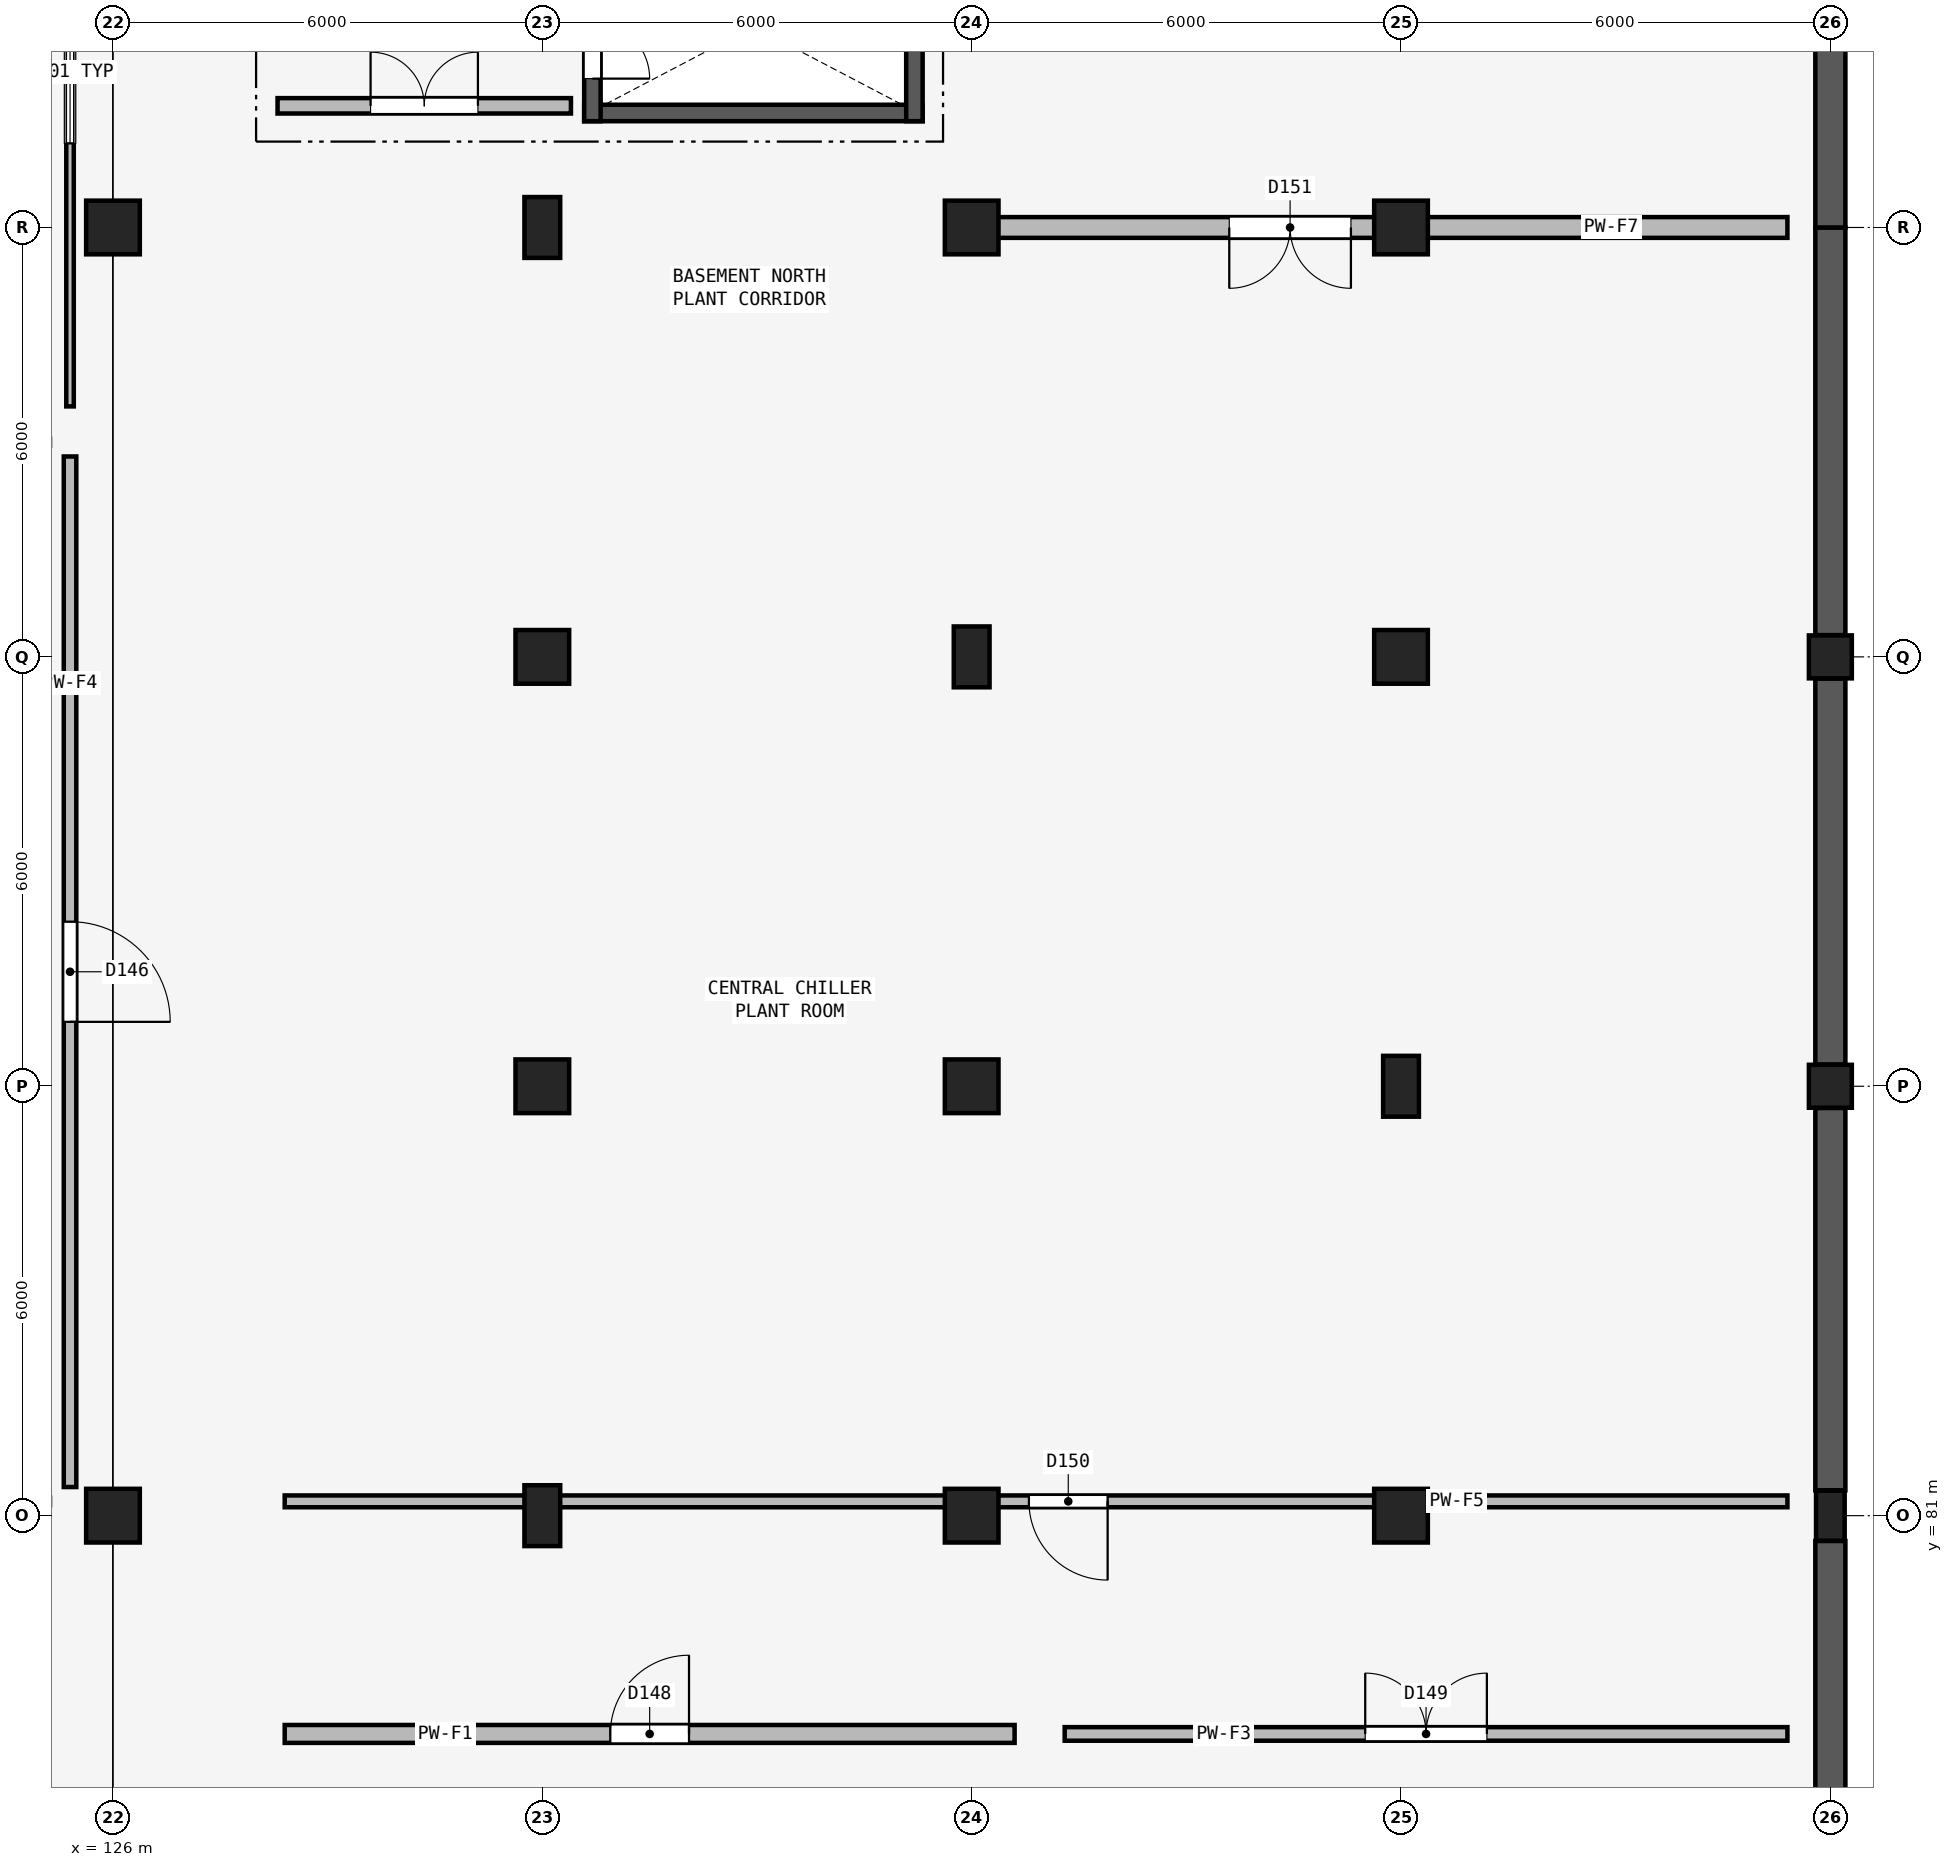
"""IFC4 building model, lengths in metres.
Left out: names, types, materials, properties, quantities, classifications, styles, units other than length and angle.
Written with IfcOpenShell. Run it as: python <this file> out.ifc"""

import sys

from ifc_helpers import new_model, si_unit, direction, frame, frame_2d, origin, origin_2d, place, context, subcontext, project, spatial, rectangle, extrude, element, fill, save


model = new_model("IFC4")
c1 = context("Model", 3, precision=1e-05, world=origin(), true_north=direction((0.0, 1.0)))
c2 = subcontext(c1, "Body", "Model", "MODEL_VIEW")
j1 = project(units=[si_unit("LENGTHUNIT", "METRE"), si_unit("PLANEANGLEUNIT", "RADIAN")], contexts=[c1])
p1 = place(None, origin())
s1 = spatial("IfcSite", under=j1, at=p1, CompositionType="ELEMENT")
p2 = place(p1, origin())
s2 = spatial("IfcBuilding", under=s1, at=p2, CompositionType="ELEMENT")
p3 = place(p2, frame((0.0, 0.0, -4.5)))
s3 = spatial("IfcBuildingStorey", under=s2, at=p3, CompositionType="ELEMENT", Elevation=-4.5)
for number, where, z_axis, x_axis in (
    (1, (126.0, 81.0, 0.0), (0.0, 0.0, 1.0), (1.0, 0.0, 0.0)),
    (2, (126.0, 99.0, 0.0), (0.0, 0.0, 1.0), (1.0, 0.0, 0.0)),
):
    element("IfcColumn", number, at=place(p3, frame(where, z_axis=z_axis, x_axis=x_axis)), inside=s3, PredefinedType="COLUMN", context=c2, shape_type="SweptSolid", body=[
        extrude(rectangle(XDim=0.75, YDim=0.75, at=origin_2d()), origin(), (0.0, 0.0, 1.0), 4.5),
    ])
p4 = place(p3, frame((132.0, 81.0, 0.0), z_axis=(0.0, 0.0, 1.0), x_axis=(1.0, 0.0, 0.0)))
e3 = element("IfcColumn", 3, at=p4, inside=s3, PredefinedType="COLUMN", context=c2, shape_type="SweptSolid", body=[
    extrude(rectangle(XDim=0.5, YDim=0.85, at=origin_2d()), origin(), (0.0, 0.0, 1.0), 4.5),
])
for number, where, z_axis, x_axis in (
    (4, (132.0, 87.0, 0.0), (0.0, 0.0, 1.0), (1.0, 0.0, 0.0)),
    (5, (132.0, 93.0, 0.0), (0.0, 0.0, 1.0), (1.0, 0.0, 0.0)),
):
    element("IfcColumn", number, at=place(p3, frame(where, z_axis=z_axis, x_axis=x_axis)), inside=s3, PredefinedType="COLUMN", context=c2, shape_type="SweptSolid", body=[
        extrude(rectangle(XDim=0.75, YDim=0.75, at=origin_2d()), origin(), (0.0, 0.0, 1.0), 4.5),
    ])
p5 = place(p3, frame((132.0, 99.0, 0.0), z_axis=(0.0, 0.0, 1.0), x_axis=(1.0, 0.0, 0.0)))
e6 = element("IfcColumn", 6, at=p5, inside=s3, PredefinedType="COLUMN", context=c2, shape_type="SweptSolid", body=[
    extrude(rectangle(XDim=0.5, YDim=0.85, at=origin_2d()), origin(), (0.0, 0.0, 1.0), 4.5),
])
for number, where, z_axis, x_axis in (
    (7, (138.0, 81.0, 0.0), (0.0, 0.0, 1.0), (1.0, 0.0, 0.0)),
    (8, (138.0, 87.0, 0.0), (0.0, 0.0, 1.0), (1.0, 0.0, 0.0)),
):
    element("IfcColumn", number, at=place(p3, frame(where, z_axis=z_axis, x_axis=x_axis)), inside=s3, PredefinedType="COLUMN", context=c2, shape_type="SweptSolid", body=[
        extrude(rectangle(XDim=0.75, YDim=0.75, at=origin_2d()), origin(), (0.0, 0.0, 1.0), 4.5),
    ])
p6 = place(p3, frame((138.0, 93.0, 0.0), z_axis=(0.0, 0.0, 1.0), x_axis=(1.0, 0.0, 0.0)))
e9 = element("IfcColumn", 9, at=p6, inside=s3, PredefinedType="COLUMN", context=c2, shape_type="SweptSolid", body=[
    extrude(rectangle(XDim=0.5, YDim=0.85, at=origin_2d()), origin(), (0.0, 0.0, 1.0), 4.5),
])
for number, where, z_axis, x_axis in (
    (10, (138.0, 99.0, 0.0), (0.0, 0.0, 1.0), (1.0, 0.0, 0.0)),
    (11, (144.0, 81.0, 0.0), (0.0, 0.0, 1.0), (1.0, 0.0, 0.0)),
):
    element("IfcColumn", number, at=place(p3, frame(where, z_axis=z_axis, x_axis=x_axis)), inside=s3, PredefinedType="COLUMN", context=c2, shape_type="SweptSolid", body=[
        extrude(rectangle(XDim=0.75, YDim=0.75, at=origin_2d()), origin(), (0.0, 0.0, 1.0), 4.5),
    ])
p7 = place(p3, frame((144.0, 87.0, 0.0), z_axis=(0.0, 0.0, 1.0), x_axis=(1.0, 0.0, 0.0)))
e12 = element("IfcColumn", 12, at=p7, inside=s3, PredefinedType="COLUMN", context=c2, shape_type="SweptSolid", body=[
    extrude(rectangle(XDim=0.5, YDim=0.85, at=origin_2d()), origin(), (0.0, 0.0, 1.0), 4.5),
])
for number, where, z_axis, x_axis in (
    (13, (144.0, 93.0, 0.0), (0.0, 0.0, 1.0), (1.0, 0.0, 0.0)),
    (14, (144.0, 99.0, 0.0), (0.0, 0.0, 1.0), (1.0, 0.0, 0.0)),
):
    element("IfcColumn", number, at=place(p3, frame(where, z_axis=z_axis, x_axis=x_axis)), inside=s3, PredefinedType="COLUMN", context=c2, shape_type="SweptSolid", body=[
        extrude(rectangle(XDim=0.75, YDim=0.75, at=origin_2d()), origin(), (0.0, 0.0, 1.0), 4.5),
    ])
p8 = place(p3, frame((150.0, 81.0, 0.0), z_axis=(0.0, 0.0, 1.0), x_axis=(1.0, 0.0, 0.0)))
e15 = element("IfcColumn", 15, at=p8, inside=s3, PredefinedType="COLUMN", context=c2, shape_type="SweptSolid", body=[
    extrude(rectangle(XDim=0.4, YDim=0.7, at=origin_2d()), origin(), (0.0, 0.0, 1.0), 4.5),
])
for number, where, z_axis, x_axis in (
    (16, (150.0, 87.0, 0.0), (0.0, 0.0, 1.0), (1.0, 0.0, 0.0)),
    (17, (150.0, 93.0, 0.0), (0.0, 0.0, 1.0), (1.0, 0.0, 0.0)),
):
    element("IfcColumn", number, at=place(p3, frame(where, z_axis=z_axis, x_axis=x_axis)), inside=s3, PredefinedType="COLUMN", context=c2, shape_type="SweptSolid", body=[
        extrude(rectangle(XDim=0.6, YDim=0.6, at=origin_2d()), origin(), (0.0, 0.0, 1.0), 4.5),
    ])
for number, where, z_axis, x_axis in (
    (18, (150.0, 75.304, 0.0), (0.0, 0.0, 1.0), (0.0, 1.0, 0.0)),
    (19, (150.0, 81.354, 0.0), (0.0, 0.0, 1.0), (0.0, 1.0, 0.0)),
):
    element("IfcWall", number, at=place(p3, frame(where, z_axis=z_axis, x_axis=x_axis)), inside=s3, PredefinedType="SHEAR", context=c2, shape_type="SweptSolid", body=[
        extrude(rectangle(XDim=5.342, YDim=0.42, at=frame_2d((2.671, 0.0))), origin(), (0.0, 0.0, 1.0), 4.195),
    ])
p9 = place(p3, frame((150.0, 87.304, 0.0), z_axis=(0.0, 0.0, 1.0), x_axis=(0.0, 1.0, 0.0)))
e20 = element("IfcWall", 20, at=p9, inside=s3, PredefinedType="SHEAR", context=c2, shape_type="SweptSolid", body=[
    extrude(rectangle(XDim=5.392, YDim=0.42, at=frame_2d((2.696, 0.0))), origin(), (0.0, 0.0, 1.0), 4.195),
])
p10 = place(p3, frame((150.0, 93.304, 0.0), z_axis=(0.0, 0.0, 1.0), x_axis=(0.0, 1.0, 0.0)))
e21 = element("IfcWall", 21, at=p10, inside=s3, PredefinedType="SHEAR", context=c2, shape_type="SweptSolid", body=[
    extrude(rectangle(XDim=5.696, YDim=0.42, at=frame_2d((2.848, 0.0))), origin(), (0.0, 0.0, 1.0), 4.195),
])
p11 = place(p3, frame((150.0, 99.0, 0.0), z_axis=(0.0, 0.0, 1.0), x_axis=(0.0, 1.0, 0.0)))
e22 = element("IfcWall", 22, at=p11, inside=s3, PredefinedType="SHEAR", context=c2, shape_type="SweptSolid", body=[
    extrude(rectangle(XDim=6.0, YDim=0.42, at=frame_2d((3.0, 0.0))), origin(), (0.0, 0.0, 1.0), 4.195),
])
p12 = place(p3, frame((132.585, 100.6, 0.0), z_axis=(0.0, 0.0, 1.0), x_axis=(1.0, 0.0, 0.0)))
e23 = element("IfcWall", 23, at=p12, inside=s3, PredefinedType="SHEAR", context=c2, shape_type="SweptSolid", body=[
    extrude(rectangle(XDim=4.73, YDim=0.23, at=frame_2d((2.365, 0.0))), origin(), (0.0, 0.0, 1.0), 4.36),
])
p13 = place(p3, frame((137.2, 100.485, 0.0), z_axis=(0.0, 0.0, 1.0), x_axis=(0.0, 1.0, 0.0)))
e24 = element("IfcWall", 24, at=p13, inside=s3, PredefinedType="SHEAR", context=c2, shape_type="SweptSolid", body=[
    extrude(rectangle(XDim=9.53, YDim=0.23, at=frame_2d((4.765, 0.0))), origin(), (0.0, 0.0, 1.0), 4.36),
])
p14 = place(p3, frame((132.7, 110.015, 0.0), z_axis=(0.0, 0.0, 1.0), x_axis=(0.0, -1.0, 0.0)))
e25 = element("IfcWall", 25, at=p14, inside=s3, PredefinedType="SHEAR", context=c2, shape_type="SweptSolid", body=[
    extrude(rectangle(XDim=9.53, YDim=0.23, at=frame_2d((4.765, 0.0))), origin(), (0.0, 0.0, 1.0), 4.36),
])
p15 = place(p14, frame((7.335, 0.0, 0.0)))
e26 = element("IfcOpeningElement", 26, at=p15, cuts=e25, PredefinedType="OPENING", context=c2, shape_type="SweptSolid", body=[
    extrude(rectangle(XDim=1.6, YDim=2.2, at=frame_2d((0.8, 1.1))), frame((0.0, 0.125, 0.0), z_axis=(0.0, -1.0, 0.0), x_axis=(1.0, 0.0, 0.0)), (0.0, 0.0, 1.0), 0.25),
])
p16 = place(p3, frame((128.3, 100.7, 0.0), z_axis=(0.0, 0.0, 1.0), x_axis=(1.0, 0.0, 0.0)))
e27 = element("IfcWall", 27, at=p16, inside=s3, PredefinedType="PARTITIONING", context=c2, shape_type="SweptSolid", body=[
    extrude(rectangle(XDim=4.1, YDim=0.215, at=frame_2d((2.05, 0.0))), origin(), (0.0, 0.0, 1.0), 3.44),
])
p17 = place(p16, frame((1.3, 0.0, 0.0)))
e28 = element("IfcOpeningElement", 28, at=p17, cuts=e27, PredefinedType="OPENING", context=c2, shape_type="SweptSolid", body=[
    extrude(rectangle(XDim=1.5, YDim=2.15, at=frame_2d((0.75, 1.075))), frame((0.0, 0.117, 0.0), z_axis=(0.0, -1.0, 0.0), x_axis=(1.0, 0.0, 0.0)), (0.0, 0.0, 1.0), 0.235),
])
p18 = place(p3, frame((125.4, 95.8, 0.0), z_axis=(0.0, 0.0, 1.0), x_axis=(0.0, -1.0, 0.0)))
e29 = element("IfcWall", 29, at=p18, inside=s3, PredefinedType="PARTITIONING", context=c2, shape_type="SweptSolid", body=[
    extrude(rectangle(XDim=14.4, YDim=0.175, at=frame_2d((7.2, 0.0))), origin(), (0.0, 0.0, 1.0), 4.19),
])
p19 = place(p18, frame((6.5, 0.0, 0.0)))
e30 = element("IfcOpeningElement", 30, at=p19, cuts=e29, PredefinedType="OPENING", context=c2, shape_type="SweptSolid", body=[
    extrude(rectangle(XDim=1.4, YDim=2.25, at=frame_2d((0.7, 1.125))), frame((0.0, 0.097, 0.0), z_axis=(0.0, -1.0, 0.0), x_axis=(1.0, 0.0, 0.0)), (0.0, 0.0, 1.0), 0.195),
])
p20 = place(p3, frame((125.4, 110.2, 0.0), z_axis=(0.0, 0.0, 1.0), x_axis=(0.0, -1.0, 0.0)))
e31 = element("IfcWall", 31, at=p20, inside=s3, PredefinedType="PARTITIONING", context=c2, shape_type="SweptSolid", body=[
    extrude(rectangle(XDim=13.7, YDim=0.105, at=frame_2d((6.85, 0.0))), origin(), (0.0, 0.0, 1.0), 3.49),
])
p21 = place(p20, frame((6.325, 0.0, 0.0)))
e32 = element("IfcOpeningElement", 32, at=p21, cuts=e31, PredefinedType="OPENING", context=c2, shape_type="SweptSolid", body=[
    extrude(rectangle(XDim=1.05, YDim=2.2, at=frame_2d((0.525, 1.1))), frame((0.0, 0.062, 0.0), z_axis=(0.0, -1.0, 0.0), x_axis=(1.0, 0.0, 0.0)), (0.0, 0.0, 1.0), 0.125),
])
p22 = place(p20, frame((8.025, 0.0, 1.0)))
e33 = element("IfcOpeningElement", 33, at=p22, cuts=e31, PredefinedType="OPENING", context=c2, shape_type="SweptSolid", body=[
    extrude(rectangle(XDim=2.0, YDim=1.2, at=frame_2d((1.0, 0.6))), frame((0.0, 0.062, 0.0), z_axis=(0.0, -1.0, 0.0), x_axis=(1.0, 0.0, 0.0)), (0.0, 0.0, 1.0), 0.125),
])
p23 = place(p3, frame((128.4, 77.95, 0.0), z_axis=(0.0, 0.0, 1.0), x_axis=(1.0, 0.0, 0.0)))
e34 = element("IfcWall", 34, at=p23, inside=s3, PredefinedType="PARTITIONING", context=c2, shape_type="SweptSolid", body=[
    extrude(rectangle(XDim=10.2, YDim=0.25, at=frame_2d((5.1, 0.0))), origin(), (0.0, 0.0, 1.0), 3.44),
])
p24 = place(p23, frame((4.55, 0.0, 0.0)))
e35 = element("IfcOpeningElement", 35, at=p24, cuts=e34, PredefinedType="OPENING", context=c2, shape_type="SweptSolid", body=[
    extrude(rectangle(XDim=1.1, YDim=2.1, at=frame_2d((0.55, 1.05))), frame((0.0, 0.135, 0.0), z_axis=(0.0, -1.0, 0.0), x_axis=(1.0, 0.0, 0.0)), (0.0, 0.0, 1.0), 0.27),
])
p25 = place(p3, frame((139.3, 77.95, 0.0), z_axis=(0.0, 0.0, 1.0), x_axis=(1.0, 0.0, 0.0)))
e36 = element("IfcWall", 36, at=p25, inside=s3, PredefinedType="PARTITIONING", context=c2, shape_type="SweptSolid", body=[
    extrude(rectangle(XDim=10.1, YDim=0.19, at=frame_2d((5.05, 0.0))), origin(), (0.0, 0.0, 1.0), 3.44),
])
p26 = place(p25, frame((4.2, 0.0, 0.0)))
e37 = element("IfcOpeningElement", 37, at=p26, cuts=e36, PredefinedType="OPENING", context=c2, shape_type="SweptSolid", body=[
    extrude(rectangle(XDim=1.7, YDim=2.35, at=frame_2d((0.85, 1.175))), frame((0.0, 0.105, 0.0), z_axis=(0.0, -1.0, 0.0), x_axis=(1.0, 0.0, 0.0)), (0.0, 0.0, 1.0), 0.21),
])
p27 = place(p3, frame((149.4, 81.2, 0.0), z_axis=(0.0, 0.0, 1.0), x_axis=(-1.0, 0.0, 0.0)))
e38 = element("IfcWall", 38, at=p27, inside=s3, PredefinedType="PARTITIONING", context=c2, shape_type="SweptSolid", body=[
    extrude(rectangle(XDim=21.0, YDim=0.165, at=frame_2d((10.5, 0.0))), origin(), (0.0, 0.0, 1.0), 3.44),
])
p28 = place(p27, frame((9.5, 0.0, 0.0)))
e39 = element("IfcOpeningElement", 39, at=p28, cuts=e38, PredefinedType="OPENING", context=c2, shape_type="SweptSolid", body=[
    extrude(rectangle(XDim=1.1, YDim=2.1, at=frame_2d((0.55, 1.05))), frame((0.0, 0.093, 0.0), z_axis=(0.0, -1.0, 0.0), x_axis=(1.0, 0.0, 0.0)), (0.0, 0.0, 1.0), 0.185),
])
p29 = place(p3, frame((149.4, 99.0, 0.0), z_axis=(0.0, 0.0, 1.0), x_axis=(-1.0, 0.0, 0.0)))
e40 = element("IfcWall", 40, at=p29, inside=s3, PredefinedType="PARTITIONING", context=c2, shape_type="SweptSolid", body=[
    extrude(rectangle(XDim=11.2, YDim=0.29, at=frame_2d((5.6, 0.0))), origin(), (0.0, 0.0, 1.0), 2.99),
])
p30 = place(p29, frame((6.1, 0.0, 0.0)))
e41 = element("IfcOpeningElement", 41, at=p30, cuts=e40, PredefinedType="OPENING", context=c2, shape_type="SweptSolid", body=[
    extrude(rectangle(XDim=1.7, YDim=2.35, at=frame_2d((0.85, 1.175))), frame((0.0, 0.155, 0.0), z_axis=(0.0, -1.0, 0.0), x_axis=(1.0, 0.0, 0.0)), (0.0, 0.0, 1.0), 0.31),
])
p31 = place(p15, origin())
e42 = element("IfcDoor", 42, at=p31, inside=s3, OperationType="DOUBLE_DOOR_SINGLE_SWING", PredefinedType="DOOR", context=c2, shape_type="SweptSolid", body=[
    extrude(rectangle(XDim=1.6, YDim=2.2, at=frame_2d((0.8, 1.1))), frame((0.0, 0.025, 0.0), z_axis=(0.0, -1.0, 0.0), x_axis=(1.0, 0.0, 0.0)), (0.0, 0.0, 1.0), 0.05),
])
fill(e26, e42)
p32 = place(p17, origin())
e43 = element("IfcDoor", 43, at=p32, inside=s3, OperationType="DOUBLE_DOOR_SINGLE_SWING", PredefinedType="DOOR", context=c2, shape_type="SweptSolid", body=[
    extrude(rectangle(XDim=1.5, YDim=2.15, at=frame_2d((0.75, 1.075))), frame((0.0, 0.025, 0.0), z_axis=(0.0, -1.0, 0.0), x_axis=(1.0, 0.0, 0.0)), (0.0, 0.0, 1.0), 0.05),
])
fill(e28, e43)
p33 = place(p19, origin())
e44 = element("IfcDoor", 44, at=p33, inside=s3, OperationType="SINGLE_SWING_RIGHT", PredefinedType="DOOR", context=c2, shape_type="SweptSolid", body=[
    extrude(rectangle(XDim=1.4, YDim=2.25, at=frame_2d((0.7, 1.125))), frame((0.0, 0.025, 0.0), z_axis=(0.0, -1.0, 0.0), x_axis=(1.0, 0.0, 0.0)), (0.0, 0.0, 1.0), 0.05),
])
fill(e30, e44)
p34 = place(p22, origin())
e45 = element("IfcWindow", 45, at=p34, inside=s3, PartitioningType="SINGLE_PANEL", PredefinedType="WINDOW", context=c2, shape_type="SweptSolid", body=[
    extrude(rectangle(XDim=2.0, YDim=1.2, at=frame_2d((1.0, 0.6))), frame((0.0, 0.03, 0.0), z_axis=(0.0, -1.0, 0.0), x_axis=(1.0, 0.0, 0.0)), (0.0, 0.0, 1.0), 0.06),
])
fill(e33, e45)
p35 = place(p24, origin())
e46 = element("IfcDoor", 46, at=p35, inside=s3, OperationType="SINGLE_SWING_RIGHT", PredefinedType="DOOR", context=c2, shape_type="SweptSolid", body=[
    extrude(rectangle(XDim=1.1, YDim=2.1, at=frame_2d((0.55, 1.05))), frame((0.0, 0.025, 0.0), z_axis=(0.0, -1.0, 0.0), x_axis=(1.0, 0.0, 0.0)), (0.0, 0.0, 1.0), 0.05),
])
fill(e35, e46)
p36 = place(p26, origin())
e47 = element("IfcDoor", 47, at=p36, inside=s3, OperationType="DOUBLE_DOOR_SINGLE_SWING", PredefinedType="DOOR", context=c2, shape_type="SweptSolid", body=[
    extrude(rectangle(XDim=1.7, YDim=2.35, at=frame_2d((0.85, 1.175))), frame((0.0, 0.025, 0.0), z_axis=(0.0, -1.0, 0.0), x_axis=(1.0, 0.0, 0.0)), (0.0, 0.0, 1.0), 0.05),
])
fill(e37, e47)
p37 = place(p28, origin())
e48 = element("IfcDoor", 48, at=p37, inside=s3, OperationType="SINGLE_SWING_LEFT", PredefinedType="DOOR", context=c2, shape_type="SweptSolid", body=[
    extrude(rectangle(XDim=1.1, YDim=2.1, at=frame_2d((0.55, 1.05))), frame((0.0, 0.025, 0.0), z_axis=(0.0, -1.0, 0.0), x_axis=(1.0, 0.0, 0.0)), (0.0, 0.0, 1.0), 0.05),
])
fill(e39, e48)
p38 = place(p30, origin())
e49 = element("IfcDoor", 49, at=p38, inside=s3, OperationType="DOUBLE_DOOR_SINGLE_SWING", PredefinedType="DOOR", context=c2, shape_type="SweptSolid", body=[
    extrude(rectangle(XDim=1.7, YDim=2.35, at=frame_2d((0.85, 1.175))), frame((0.0, 0.025, 0.0), z_axis=(0.0, -1.0, 0.0), x_axis=(1.0, 0.0, 0.0)), (0.0, 0.0, 1.0), 0.05),
])
fill(e41, e49)
save(model, sys.argv[1])
